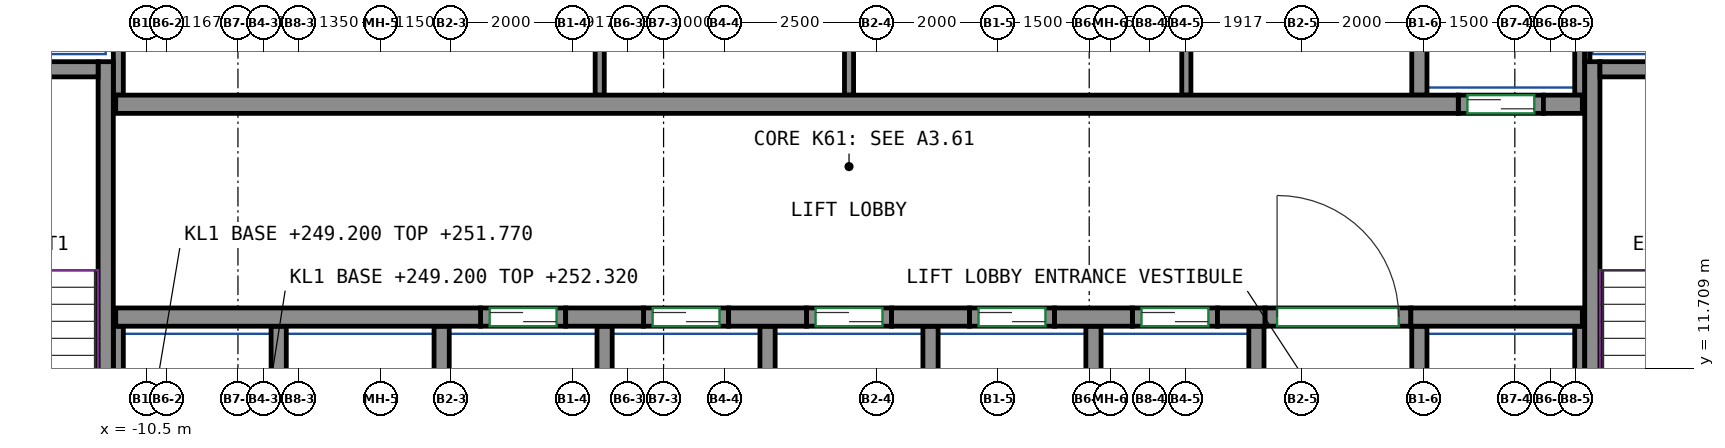
"""IFC4 building model, lengths in metres.
Left out: names, types, materials, properties, quantities, classifications, styles, units other than length and angle.
Written with IfcOpenShell. Run it as: python <this file> out.ifc"""

import sys

from ifc_helpers import new_model, si_unit, direction, frame, frame_2d, origin, place, context, subcontext, project, spatial, rectangle, extrude, source, transform, mapped, element, fill, save


model = new_model("IFC4")
c1 = context("Model", 3, precision=1e-05, world=origin(), true_north=direction((0.0, 1.0)))
c2 = subcontext(c1, "Body", "Model", "MODEL_VIEW")
j1 = project(units=[si_unit("LENGTHUNIT", "METRE"), si_unit("PLANEANGLEUNIT", "RADIAN")], contexts=[c1])
p1 = place(None, origin())
s1 = spatial("IfcSite", under=j1, at=p1, CompositionType="ELEMENT")
p2 = place(p1, origin())
s2 = spatial("IfcBuilding", under=s1, at=p2, CompositionType="ELEMENT")
p3 = place(p2, frame((0.0, 0.0, 249.2)))
s3 = spatial("IfcBuildingStorey", under=s2, at=p3, CompositionType="ELEMENT", Elevation=249.2)
m1 = source(origin(), c2, "Body", "SweptSolid", [
    extrude(rectangle(XDim=7.75, YDim=0.25, at=frame_2d((3.875, 0.0))), origin(), (0.0, 0.0, 1.0), 3.12),
])
p4 = place(p3, frame((-11.175, 9.0, 0.0), z_axis=(0.0, 0.0, 1.0), x_axis=(0.0, 1.0, 0.0)))
e1 = element("IfcWall", 1, at=p4, inside=s3, PredefinedType="SHEAR", context=c2, shape_type="MappedRepresentation", body=[
    mapped(m1, transform((0.0, 0.0, 0.0))),
])
m2 = source(origin(), c2, "Body", "SweptSolid", [
    extrude(rectangle(XDim=3.7, YDim=0.25, at=frame_2d((1.85, 0.0))), origin(), (0.0, 0.0, 1.0), 3.12),
])
p5 = place(p3, frame((-15.0, 16.625, 0.0), z_axis=(0.0, 0.0, 1.0), x_axis=(1.0, 0.0, 0.0)))
e2 = element("IfcWall", 2, at=p5, inside=s3, PredefinedType="SHEAR", context=c2, shape_type="MappedRepresentation", body=[
    mapped(m2, transform((0.0, 0.0, 0.0))),
])
p6 = place(p3, frame((13.275, 9.0, 0.0), z_axis=(0.0, 0.0, 1.0), x_axis=(0.0, 1.0, 0.0)))
e3 = element("IfcWall", 3, at=p6, inside=s3, PredefinedType="SHEAR", context=c2, shape_type="MappedRepresentation", body=[
    mapped(m1, transform((0.0, 0.0, 0.0))),
])
m3 = source(origin(), c2, "Body", "SweptSolid", [
    extrude(rectangle(XDim=3.7, YDim=0.25, at=frame_2d((1.85, 0.0))), origin(), (0.0, 0.0, 1.0), 3.12),
])
p7 = place(p3, frame((13.4, 16.625, 0.0), z_axis=(0.0, 0.0, 1.0), x_axis=(1.0, 0.0, 0.0)))
e4 = element("IfcWall", 4, at=p7, inside=s3, PredefinedType="SHEAR", context=c2, shape_type="MappedRepresentation", body=[
    mapped(m3, transform((0.0, 0.0, 0.0))),
])
m4 = source(origin(), c2, "Body", "SweptSolid", [
    extrude(rectangle(XDim=6.0, YDim=0.3, at=frame_2d((3.0, 0.0))), origin(), (0.0, 0.0, 1.0), 3.12),
])
p8 = place(p3, frame((-11.01, 12.55, 0.0), z_axis=(0.0, 0.0, 1.0), x_axis=(1.0, 0.0, 0.0)))
e5 = element("IfcWall", 5, at=p8, inside=s3, PredefinedType="SHEAR", context=c2, shape_type="MappedRepresentation", body=[
    mapped(m4, transform((0.0, 0.0, 0.0))),
])
m5 = source(origin(), c2, "Body", "SweptSolid", [
    extrude(rectangle(XDim=1.28, YDim=0.3, at=frame_2d((0.64, 0.0))), origin(), (0.0, 0.0, 1.0), 3.12),
])
for number, where, z_axis, x_axis in (
    (6, (-3.61, 12.55, 0.0), (0.0, 0.0, 1.0), (1.0, 0.0, 0.0)),
    (7, (-0.93, 12.55, 0.0), (0.0, 0.0, 1.0), (1.0, 0.0, 0.0)),
    (8, (1.75, 12.55, 0.0), (0.0, 0.0, 1.0), (1.0, 0.0, 0.0)),
    (9, (4.43, 12.55, 0.0), (0.0, 0.0, 1.0), (1.0, 0.0, 0.0)),
):
    element("IfcWall", number, at=place(p3, frame(where, z_axis=z_axis, x_axis=x_axis)), inside=s3, PredefinedType="SHEAR", context=c2, shape_type="MappedRepresentation", body=[
        mapped(m5, transform((0.0, 0.0, 0.0))),
    ])
m6 = source(origin(), c2, "Body", "SweptSolid", [
    extrude(rectangle(XDim=0.78, YDim=0.3, at=frame_2d((0.39, 0.0))), origin(), (0.0, 0.0, 1.0), 3.12),
])
p9 = place(p3, frame((7.11, 12.55, 0.0), z_axis=(0.0, 0.0, 1.0), x_axis=(1.0, 0.0, 0.0)))
e10 = element("IfcWall", 10, at=p9, inside=s3, PredefinedType="SHEAR", context=c2, shape_type="MappedRepresentation", body=[
    mapped(m6, transform((0.0, 0.0, 0.0))),
])
m7 = source(origin(), c2, "Body", "SweptSolid", [
    extrude(rectangle(XDim=2.82, YDim=0.3, at=frame_2d((1.41, 0.0))), origin(), (0.0, 0.0, 1.0), 3.12),
])
p10 = place(p3, frame((10.29, 12.55, 0.0), z_axis=(0.0, 0.0, 1.0), x_axis=(1.0, 0.0, 0.0)))
e11 = element("IfcWall", 11, at=p10, inside=s3, PredefinedType="SHEAR", context=c2, shape_type="MappedRepresentation", body=[
    mapped(m7, transform((0.0, 0.0, 0.0))),
])
m8 = source(origin(), c2, "Body", "SweptSolid", [
    extrude(rectangle(XDim=22.08, YDim=0.3, at=frame_2d((11.04, 0.0))), origin(), (0.0, 0.0, 1.0), 3.12),
])
p11 = place(p3, frame((-11.01, 16.05, 0.0), z_axis=(0.0, 0.0, 1.0), x_axis=(1.0, 0.0, 0.0)))
e12 = element("IfcWall", 12, at=p11, inside=s3, PredefinedType="SHEAR", context=c2, shape_type="MappedRepresentation", body=[
    mapped(m8, transform((0.0, 0.0, 0.0))),
])
m9 = source(origin(), c2, "Body", "SweptSolid", [
    extrude(rectangle(XDim=0.64, YDim=0.3, at=frame_2d((0.32, 0.0))), origin(), (0.0, 0.0, 1.0), 3.12),
])
p12 = place(p3, frame((12.47, 16.05, 0.0), z_axis=(0.0, 0.0, 1.0), x_axis=(1.0, 0.0, 0.0)))
e13 = element("IfcWall", 13, at=p12, inside=s3, PredefinedType="SHEAR", context=c2, shape_type="MappedRepresentation", body=[
    mapped(m9, transform((0.0, 0.0, 0.0))),
])
m10 = source(origin(), c2, "Body", "SweptSolid", [
    extrude(rectangle(XDim=1.4, YDim=0.3, at=frame_2d((0.7, 0.0))), origin(), (0.0, 0.0, 1.0), 3.12),
])
p13 = place(p3, frame((-5.01, 12.55, 0.0), z_axis=(0.0, 0.0, 1.0), x_axis=(1.0, 0.0, 0.0)))
e14 = element("IfcWall", 14, at=p13, inside=s3, PredefinedType="PARTITIONING", context=c2, shape_type="MappedRepresentation", body=[
    mapped(m10, transform((0.0, 0.0, 0.0))),
])
p14 = place(p13, frame((0.15, 0.0, 0.0)))
e15 = element("IfcOpeningElement", 15, at=p14, cuts=e14, PredefinedType="OPENING", context=c2, shape_type="SweptSolid", body=[
    extrude(rectangle(XDim=1.1, YDim=2.1, at=frame_2d((0.55, 1.05))), frame((0.0, 0.16, 0.0), z_axis=(0.0, -1.0, 0.0), x_axis=(1.0, 0.0, 0.0)), (0.0, 0.0, 1.0), 0.32),
])
m11 = source(origin(), c2, "Body", "SweptSolid", [
    extrude(rectangle(XDim=1.4, YDim=0.3, at=frame_2d((0.7, 0.0))), origin(), (0.0, 0.0, 1.0), 3.12),
])
p15 = place(p3, frame((-2.33, 12.55, 0.0), z_axis=(0.0, 0.0, 1.0), x_axis=(1.0, 0.0, 0.0)))
e16 = element("IfcWall", 16, at=p15, inside=s3, PredefinedType="PARTITIONING", context=c2, shape_type="MappedRepresentation", body=[
    mapped(m11, transform((0.0, 0.0, 0.0))),
])
p16 = place(p15, frame((0.15, 0.0, 0.0)))
e17 = element("IfcOpeningElement", 17, at=p16, cuts=e16, PredefinedType="OPENING", context=c2, shape_type="SweptSolid", body=[
    extrude(rectangle(XDim=1.1, YDim=2.1, at=frame_2d((0.55, 1.05))), frame((0.0, 0.16, 0.0), z_axis=(0.0, -1.0, 0.0), x_axis=(1.0, 0.0, 0.0)), (0.0, 0.0, 1.0), 0.32),
])
p17 = place(p3, frame((0.35, 12.55, 0.0), z_axis=(0.0, 0.0, 1.0), x_axis=(1.0, 0.0, 0.0)))
e18 = element("IfcWall", 18, at=p17, inside=s3, PredefinedType="PARTITIONING", context=c2, shape_type="MappedRepresentation", body=[
    mapped(m10, transform((0.0, 0.0, 0.0))),
])
p18 = place(p17, frame((0.15, 0.0, 0.0)))
e19 = element("IfcOpeningElement", 19, at=p18, cuts=e18, PredefinedType="OPENING", context=c2, shape_type="SweptSolid", body=[
    extrude(rectangle(XDim=1.1, YDim=2.1, at=frame_2d((0.55, 1.05))), frame((0.0, 0.16, 0.0), z_axis=(0.0, -1.0, 0.0), x_axis=(1.0, 0.0, 0.0)), (0.0, 0.0, 1.0), 0.32),
])
p19 = place(p3, frame((3.03, 12.55, 0.0), z_axis=(0.0, 0.0, 1.0), x_axis=(1.0, 0.0, 0.0)))
e20 = element("IfcWall", 20, at=p19, inside=s3, PredefinedType="PARTITIONING", context=c2, shape_type="MappedRepresentation", body=[
    mapped(m10, transform((0.0, 0.0, 0.0))),
])
p20 = place(p19, frame((0.15, 0.0, 0.0)))
e21 = element("IfcOpeningElement", 21, at=p20, cuts=e20, PredefinedType="OPENING", context=c2, shape_type="SweptSolid", body=[
    extrude(rectangle(XDim=1.1, YDim=2.1, at=frame_2d((0.55, 1.05))), frame((0.0, 0.16, 0.0), z_axis=(0.0, -1.0, 0.0), x_axis=(1.0, 0.0, 0.0)), (0.0, 0.0, 1.0), 0.32),
])
p21 = place(p3, frame((5.71, 12.55, 0.0), z_axis=(0.0, 0.0, 1.0), x_axis=(1.0, 0.0, 0.0)))
e22 = element("IfcWall", 22, at=p21, inside=s3, PredefinedType="PARTITIONING", context=c2, shape_type="MappedRepresentation", body=[
    mapped(m11, transform((0.0, 0.0, 0.0))),
])
p22 = place(p21, frame((0.15, 0.0, 0.0)))
e23 = element("IfcOpeningElement", 23, at=p22, cuts=e22, PredefinedType="OPENING", context=c2, shape_type="SweptSolid", body=[
    extrude(rectangle(XDim=1.1, YDim=2.1, at=frame_2d((0.55, 1.05))), frame((0.0, 0.16, 0.0), z_axis=(0.0, -1.0, 0.0), x_axis=(1.0, 0.0, 0.0)), (0.0, 0.0, 1.0), 0.32),
])
p23 = place(p3, frame((11.07, 16.05, 0.0), z_axis=(0.0, 0.0, 1.0), x_axis=(1.0, 0.0, 0.0)))
e24 = element("IfcWall", 24, at=p23, inside=s3, PredefinedType="PARTITIONING", context=c2, shape_type="MappedRepresentation", body=[
    mapped(m10, transform((0.0, 0.0, 0.0))),
])
p24 = place(p23, frame((0.15, 0.0, 0.0)))
e25 = element("IfcOpeningElement", 25, at=p24, cuts=e24, PredefinedType="OPENING", context=c2, shape_type="SweptSolid", body=[
    extrude(rectangle(XDim=1.1, YDim=2.1, at=frame_2d((0.55, 1.05))), frame((0.0, 0.16, 0.0), z_axis=(0.0, -1.0, 0.0), x_axis=(1.0, 0.0, 0.0)), (0.0, 0.0, 1.0), 0.32),
])
m12 = source(origin(), c2, "Body", "SweptSolid", [
    extrude(rectangle(XDim=2.4, YDim=0.3, at=frame_2d((1.2, 0.0))), origin(), (0.0, 0.0, 1.0), 3.12),
])
p25 = place(p3, frame((7.89, 12.55, 0.0), z_axis=(0.0, 0.0, 1.0), x_axis=(1.0, 0.0, 0.0)))
e26 = element("IfcWall", 26, at=p25, inside=s3, PredefinedType="PARTITIONING", context=c2, shape_type="MappedRepresentation", body=[
    mapped(m12, transform((0.0, 0.0, 0.0))),
])
p26 = place(p25, frame((0.2, 0.0, 0.0)))
e27 = element("IfcOpeningElement", 27, at=p26, cuts=e26, PredefinedType="OPENING", context=c2, shape_type="SweptSolid", body=[
    extrude(rectangle(XDim=2.0, YDim=2.1, at=frame_2d((1.0, 1.05))), frame((0.0, 0.16, 0.0), z_axis=(0.0, -1.0, 0.0), x_axis=(1.0, 0.0, 0.0)), (0.0, 0.0, 1.0), 0.32),
])
m13 = source(origin(), c2, "Body", "SweptSolid", [
    extrude(rectangle(XDim=3.275, YDim=0.165, at=frame_2d((1.638, 0.0))), origin(), (0.0, 0.0, 1.0), 3.12),
])
p27 = place(p3, frame((13.067, 16.2, 0.0), z_axis=(0.0, 0.0, 1.0), x_axis=(0.0, 1.0, 0.0)))
e28 = element("IfcWall", 28, at=p27, inside=s3, PredefinedType="PARTITIONING", context=c2, shape_type="MappedRepresentation", body=[
    mapped(m13, transform((0.0, 0.0, 0.0))),
])
m14 = source(origin(), c2, "Body", "SweptSolid", [
    extrude(rectangle(XDim=4.8, YDim=0.165, at=frame_2d((2.4, 0.0))), origin(), (0.0, 0.0, 1.0), 3.12),
])
p28 = place(p3, frame((-10.968, 16.2, 0.0), z_axis=(0.0, 0.0, 1.0), x_axis=(0.0, 1.0, 0.0)))
e29 = element("IfcWall", 29, at=p28, inside=s3, PredefinedType="PARTITIONING", context=c2, shape_type="MappedRepresentation", body=[
    mapped(m14, transform((0.0, 0.0, 0.0))),
])
m15 = source(origin(), c2, "Body", "SweptSolid", [
    extrude(rectangle(XDim=3.275, YDim=0.25, at=frame_2d((1.638, 0.0))), origin(), (0.0, 0.0, 1.0), 3.12),
])
p29 = place(p3, frame((10.43, 16.2, 0.0), z_axis=(0.0, 0.0, 1.0), x_axis=(0.0, 1.0, 0.0)))
e30 = element("IfcWall", 30, at=p29, inside=s3, PredefinedType="PARTITIONING", context=c2, shape_type="MappedRepresentation", body=[
    mapped(m15, transform((0.0, 0.0, 0.0))),
])
m16 = source(origin(), c2, "Body", "SweptSolid", [
    extrude(rectangle(XDim=2.725, YDim=0.085, at=frame_2d((1.363, 0.0))), origin(), (0.0, 0.0, 1.0), 3.12),
])
p30 = place(p3, frame((13.192, 16.75, 0.0), z_axis=(0.0, 0.0, 1.0), x_axis=(0.0, 1.0, 0.0)))
e31 = element("IfcWall", 31, at=p30, inside=s3, PredefinedType="PARTITIONING", context=c2, shape_type="MappedRepresentation", body=[
    mapped(m16, transform((0.0, 0.0, 0.0))),
])
m17 = source(origin(), c2, "Body", "SweptSolid", [
    extrude(rectangle(XDim=3.4, YDim=0.25, at=frame_2d((1.7, 0.0))), origin(), (0.0, 0.0, 1.0), 3.12),
])
p31 = place(p3, frame((10.43, 9.0, 0.0), z_axis=(0.0, 0.0, 1.0), x_axis=(0.0, 1.0, 0.0)))
e32 = element("IfcWall", 32, at=p31, inside=s3, PredefinedType="PARTITIONING", context=c2, shape_type="MappedRepresentation", body=[
    mapped(m17, transform((0.0, 0.0, 0.0))),
])
m18 = source(origin(), c2, "Body", "SweptSolid", [
    extrude(rectangle(XDim=3.4, YDim=0.165, at=frame_2d((1.7, 0.0))), origin(), (0.0, 0.0, 1.0), 3.12),
])
p32 = place(p3, frame((13.067, 9.0, 0.0), z_axis=(0.0, 0.0, 1.0), x_axis=(0.0, 1.0, 0.0)))
e33 = element("IfcWall", 33, at=p32, inside=s3, PredefinedType="PARTITIONING", context=c2, shape_type="MappedRepresentation", body=[
    mapped(m18, transform((0.0, 0.0, 0.0))),
])
for number, where, z_axis, x_axis in (
    (34, (2.39, 9.0, 0.0), (0.0, 0.0, 1.0), (0.0, 1.0, 0.0)),
    (35, (5.07, 9.0, 0.0), (0.0, 0.0, 1.0), (0.0, 1.0, 0.0)),
    (36, (7.75, 9.0, 0.0), (0.0, 0.0, 1.0), (0.0, 1.0, 0.0)),
    (37, (-0.29, 9.0, 0.0), (0.0, 0.0, 1.0), (0.0, 1.0, 0.0)),
):
    element("IfcWall", number, at=place(p3, frame(where, z_axis=z_axis, x_axis=x_axis)), inside=s3, PredefinedType="PARTITIONING", context=c2, shape_type="MappedRepresentation", body=[
        mapped(m17, transform((0.0, 0.0, 0.0))),
    ])
p33 = place(p3, frame((-10.968, 9.0, 0.0), z_axis=(0.0, 0.0, 1.0), x_axis=(0.0, 1.0, 0.0)))
e38 = element("IfcWall", 38, at=p33, inside=s3, PredefinedType="PARTITIONING", context=c2, shape_type="MappedRepresentation", body=[
    mapped(m18, transform((0.0, 0.0, 0.0))),
])
for number, where, z_axis, x_axis in (
    (39, (-2.97, 9.0, 0.0), (0.0, 0.0, 1.0), (0.0, 1.0, 0.0)),
    (40, (-5.65, 9.0, 0.0), (0.0, 0.0, 1.0), (0.0, 1.0, 0.0)),
    (41, (-8.33, 9.0, 0.0), (0.0, 0.0, 1.0), (0.0, 1.0, 0.0)),
):
    element("IfcWall", number, at=place(p3, frame(where, z_axis=z_axis, x_axis=x_axis)), inside=s3, PredefinedType="PARTITIONING", context=c2, shape_type="MappedRepresentation", body=[
        mapped(m17, transform((0.0, 0.0, 0.0))),
    ])
m19 = source(origin(), c2, "Body", "SweptSolid", [
    extrude(rectangle(XDim=4.8, YDim=0.15, at=frame_2d((2.4, 0.0))), origin(), (0.0, 0.0, 1.0), 3.12),
])
for number, where, z_axis, x_axis in (
    (42, (-3.05, 16.2, 0.0), (0.0, 0.0, 1.0), (0.0, 1.0, 0.0)),
    (43, (1.05, 16.2, 0.0), (0.0, 0.0, 1.0), (0.0, 1.0, 0.0)),
    (44, (6.598, 16.2, 0.0), (0.0, 0.0, 1.0), (0.0, 1.0, 0.0)),
):
    element("IfcWall", number, at=place(p3, frame(where, z_axis=z_axis, x_axis=x_axis)), inside=s3, PredefinedType="PARTITIONING", context=c2, shape_type="MappedRepresentation", body=[
        mapped(m19, transform((0.0, 0.0, 0.0))),
    ])
p34 = place(p26, origin())
e45 = element("IfcDoor", 45, at=p34, inside=s3, OperationType="DOUBLE_DOOR_SINGLE_SWING", PredefinedType="DOOR", context=c2, shape_type="SweptSolid", body=[
    extrude(rectangle(XDim=2.0, YDim=2.1, at=frame_2d((1.0, 1.05))), frame((0.0, 0.025, 0.0), z_axis=(0.0, -1.0, 0.0), x_axis=(1.0, 0.0, 0.0)), (0.0, 0.0, 1.0), 0.05),
])
fill(e27, e45)
p35 = place(p14, origin())
e46 = element("IfcDoor", 46, at=p35, inside=s3, OperationType="DOUBLE_DOOR_SLIDING", PredefinedType="DOOR", context=c2, shape_type="SweptSolid", body=[
    extrude(rectangle(XDim=1.1, YDim=2.1, at=frame_2d((0.55, 1.05))), frame((0.0, 0.025, 0.0), z_axis=(0.0, -1.0, 0.0), x_axis=(1.0, 0.0, 0.0)), (0.0, 0.0, 1.0), 0.05),
])
fill(e15, e46)
p36 = place(p16, origin())
e47 = element("IfcDoor", 47, at=p36, inside=s3, OperationType="DOUBLE_DOOR_SLIDING", PredefinedType="DOOR", context=c2, shape_type="SweptSolid", body=[
    extrude(rectangle(XDim=1.1, YDim=2.1, at=frame_2d((0.55, 1.05))), frame((0.0, 0.025, 0.0), z_axis=(0.0, -1.0, 0.0), x_axis=(1.0, 0.0, 0.0)), (0.0, 0.0, 1.0), 0.05),
])
fill(e17, e47)
p37 = place(p18, origin())
e48 = element("IfcDoor", 48, at=p37, inside=s3, OperationType="DOUBLE_DOOR_SLIDING", PredefinedType="DOOR", context=c2, shape_type="SweptSolid", body=[
    extrude(rectangle(XDim=1.1, YDim=2.1, at=frame_2d((0.55, 1.05))), frame((0.0, 0.025, 0.0), z_axis=(0.0, -1.0, 0.0), x_axis=(1.0, 0.0, 0.0)), (0.0, 0.0, 1.0), 0.05),
])
fill(e19, e48)
p38 = place(p20, origin())
e49 = element("IfcDoor", 49, at=p38, inside=s3, OperationType="DOUBLE_DOOR_SLIDING", PredefinedType="DOOR", context=c2, shape_type="SweptSolid", body=[
    extrude(rectangle(XDim=1.1, YDim=2.1, at=frame_2d((0.55, 1.05))), frame((0.0, 0.025, 0.0), z_axis=(0.0, -1.0, 0.0), x_axis=(1.0, 0.0, 0.0)), (0.0, 0.0, 1.0), 0.05),
])
fill(e21, e49)
p39 = place(p22, origin())
e50 = element("IfcDoor", 50, at=p39, inside=s3, OperationType="DOUBLE_DOOR_SLIDING", PredefinedType="DOOR", context=c2, shape_type="SweptSolid", body=[
    extrude(rectangle(XDim=1.1, YDim=2.1, at=frame_2d((0.55, 1.05))), frame((0.0, 0.025, 0.0), z_axis=(0.0, -1.0, 0.0), x_axis=(1.0, 0.0, 0.0)), (0.0, 0.0, 1.0), 0.05),
])
fill(e23, e50)
p40 = place(p24, origin())
e51 = element("IfcDoor", 51, at=p40, inside=s3, OperationType="DOUBLE_DOOR_SLIDING", PredefinedType="DOOR", context=c2, shape_type="SweptSolid", body=[
    extrude(rectangle(XDim=1.1, YDim=2.1, at=frame_2d((0.55, 1.05))), frame((0.0, 0.025, 0.0), z_axis=(0.0, -1.0, 0.0), x_axis=(1.0, 0.0, 0.0)), (0.0, 0.0, 1.0), 0.05),
])
fill(e25, e51)
save(model, sys.argv[1])
